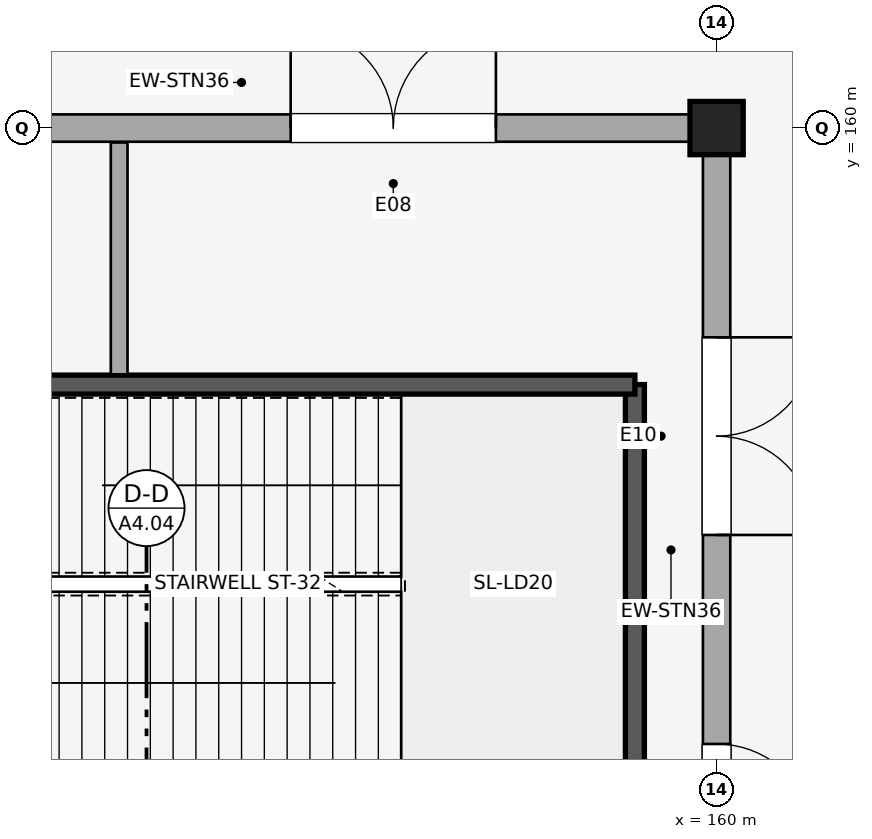
"""IFC4 building model, lengths in metres.
Left out: names, types, materials, properties, quantities, classifications, styles, units other than length and angle.
Written with IfcOpenShell. Run it as: python <this file> out.ifc"""

import sys

from ifc_helpers import new_model, si_unit, direction, frame, frame_2d, origin, origin_2d, place, context, subcontext, project, spatial, rectangle, extrude, element, fill, save


model = new_model("IFC4")
c1 = context("Model", 3, precision=1e-05, world=origin(), true_north=direction((0.0, 1.0)))
c2 = subcontext(c1, "Body", "Model", "MODEL_VIEW")
j1 = project(units=[si_unit("LENGTHUNIT", "METRE"), si_unit("PLANEANGLEUNIT", "RADIAN")], contexts=[c1])
p1 = place(None, origin())
s1 = spatial("IfcSite", under=j1, at=p1, CompositionType="ELEMENT")
p2 = place(p1, origin())
s2 = spatial("IfcBuilding", under=s1, at=p2, CompositionType="ELEMENT")
p3 = place(p2, origin())
s3 = spatial("IfcBuildingStorey", under=s2, at=p3, CompositionType="ELEMENT", Elevation=0.0)
p4 = place(p3, frame((160.0, 160.0, 0.0), z_axis=(0.0, 0.0, 1.0), x_axis=(1.0, 0.0, 0.0)))
e1 = element("IfcColumn", 1, at=p4, inside=s3, PredefinedType="COLUMN", context=c2, shape_type="SweptSolid", body=[
    extrude(rectangle(XDim=0.7, YDim=0.7, at=origin_2d()), origin(), (0.0, 0.0, 1.0), 5.4),
])
p5 = place(p3, frame((147.847, 160.0, 0.0), z_axis=(0.0, 0.0, 1.0), x_axis=(1.0, 0.0, 0.0)))
e2 = element("IfcWall", 2, at=p5, inside=s3, PredefinedType="STANDARD", context=c2, shape_type="SweptSolid", body=[
    extrude(rectangle(XDim=11.806, YDim=0.36, at=frame_2d((5.903, 0.0))), origin(), (0.0, 0.0, 1.0), 4.48),
])
p6 = place(p5, frame((1.803, 0.0, 0.0)))
e3 = element("IfcOpeningElement", 3, at=p6, cuts=e2, PredefinedType="OPENING", context=c2, shape_type="SweptSolid", body=[
    extrude(rectangle(XDim=1.3, YDim=2.2, at=frame_2d((0.65, 1.1))), frame((0.0, 0.19, 0.0), z_axis=(0.0, -1.0, 0.0), x_axis=(1.0, 0.0, 0.0)), (0.0, 0.0, 1.0), 0.38),
])
p7 = place(p5, frame((6.55, 0.0, 0.0)))
e4 = element("IfcOpeningElement", 4, at=p7, cuts=e2, PredefinedType="OPENING", context=c2, shape_type="SweptSolid", body=[
    extrude(rectangle(XDim=2.7, YDim=2.7, at=frame_2d((1.35, 1.35))), frame((0.0, 0.19, 0.0), z_axis=(0.0, -1.0, 0.0), x_axis=(1.0, 0.0, 0.0)), (0.0, 0.0, 1.0), 0.38),
])
p8 = place(p3, frame((160.0, 149.247, 0.0), z_axis=(0.0, 0.0, 1.0), x_axis=(0.0, 1.0, 0.0)))
e5 = element("IfcWall", 5, at=p8, inside=s3, PredefinedType="STANDARD", context=c2, shape_type="SweptSolid", body=[
    extrude(rectangle(XDim=10.406, YDim=0.36, at=frame_2d((5.203, 0.0))), origin(), (0.0, 0.0, 1.0), 4.48),
])
p9 = place(p8, frame((1.35, 0.0, 0.0)))
e6 = element("IfcOpeningElement", 6, at=p9, cuts=e5, PredefinedType="OPENING", context=c2, shape_type="SweptSolid", body=[
    extrude(rectangle(XDim=1.3, YDim=2.2, at=frame_2d((0.65, 1.1))), frame((0.0, 0.19, 0.0), z_axis=(0.0, -1.0, 0.0), x_axis=(1.0, 0.0, 0.0)), (0.0, 0.0, 1.0), 0.38),
])
p10 = place(p8, frame((5.4, 0.0, 0.0)))
e7 = element("IfcOpeningElement", 7, at=p10, cuts=e5, PredefinedType="OPENING", context=c2, shape_type="SweptSolid", body=[
    extrude(rectangle(XDim=2.6, YDim=2.6, at=frame_2d((1.3, 1.3))), frame((0.0, 0.19, 0.0), z_axis=(0.0, -1.0, 0.0), x_axis=(1.0, 0.0, 0.0)), (0.0, 0.0, 1.0), 0.38),
])
p11 = place(p3, frame((158.925, 151.375, 0.0), z_axis=(0.0, 0.0, 1.0), x_axis=(0.0, 1.0, 0.0)))
e8 = element("IfcWall", 8, at=p11, inside=s3, PredefinedType="SHEAR", context=c2, shape_type="SweptSolid", body=[
    extrude(rectangle(XDim=5.25, YDim=0.25, at=frame_2d((2.625, 0.0))), origin(), (0.0, 0.0, 1.0), 5.1),
])
p12 = place(p3, frame((158.925, 156.625, 0.0), z_axis=(0.0, 0.0, 1.0), x_axis=(-1.0, 0.0, 0.0)))
e9 = element("IfcWall", 9, at=p12, inside=s3, PredefinedType="SHEAR", context=c2, shape_type="SweptSolid", body=[
    extrude(rectangle(XDim=10.45, YDim=0.25, at=frame_2d((5.225, 0.0))), origin(), (0.0, 0.0, 1.0), 5.1),
])
p13 = place(p12, frame((8.4, 0.0, 0.0)))
e10 = element("IfcOpeningElement", 10, at=p13, cuts=e9, PredefinedType="OPENING", context=c2, shape_type="SweptSolid", body=[
    extrude(rectangle(XDim=1.4, YDim=2.2, at=frame_2d((0.7, 1.1))), frame((0.0, 0.135, 0.0), z_axis=(0.0, -1.0, 0.0), x_axis=(1.0, 0.0, 0.0)), (0.0, 0.0, 1.0), 0.27),
])
p14 = place(p3, frame((152.14, 156.76, 0.0), z_axis=(0.0, 0.0, 1.0), x_axis=(0.0, 1.0, 0.0)))
e11 = element("IfcWall", 11, at=p14, inside=s3, PredefinedType="PARTITIONING", context=c2, shape_type="SweptSolid", body=[
    extrude(rectangle(XDim=3.05, YDim=0.22, at=frame_2d((1.525, 0.0))), origin(), (0.0, 0.0, 1.0), 3.69),
])
p15 = place(p7, origin())
e12 = element("IfcDoor", 12, at=p15, inside=s3, OperationType="DOUBLE_DOOR_SINGLE_SWING", PredefinedType="DOOR", context=c2, shape_type="SweptSolid", body=[
    extrude(rectangle(XDim=2.7, YDim=2.7, at=frame_2d((1.35, 1.35))), frame((0.0, 0.025, 0.0), z_axis=(0.0, -1.0, 0.0), x_axis=(1.0, 0.0, 0.0)), (0.0, 0.0, 1.0), 0.05),
])
fill(e4, e12)
p16 = place(p9, frame((1.3, 0.0, 0.0), z_axis=(0.0, 0.0, 1.0), x_axis=(-1.0, 0.0, 0.0)))
e13 = element("IfcDoor", 13, at=p16, inside=s3, OperationType="SINGLE_SWING_RIGHT", PredefinedType="DOOR", context=c2, shape_type="SweptSolid", body=[
    extrude(rectangle(XDim=1.3, YDim=2.2, at=frame_2d((0.65, 1.1))), frame((0.0, 0.025, 0.0), z_axis=(0.0, -1.0, 0.0), x_axis=(1.0, 0.0, 0.0)), (0.0, 0.0, 1.0), 0.05),
])
fill(e6, e13)
p17 = place(p10, frame((2.6, 0.0, 0.0), z_axis=(0.0, 0.0, 1.0), x_axis=(-1.0, 0.0, 0.0)))
e14 = element("IfcDoor", 14, at=p17, inside=s3, OperationType="DOUBLE_DOOR_SINGLE_SWING", PredefinedType="DOOR", context=c2, shape_type="SweptSolid", body=[
    extrude(rectangle(XDim=2.6, YDim=2.6, at=frame_2d((1.3, 1.3))), frame((0.0, 0.025, 0.0), z_axis=(0.0, -1.0, 0.0), x_axis=(1.0, 0.0, 0.0)), (0.0, 0.0, 1.0), 0.05),
])
fill(e7, e14)
save(model, sys.argv[1])
